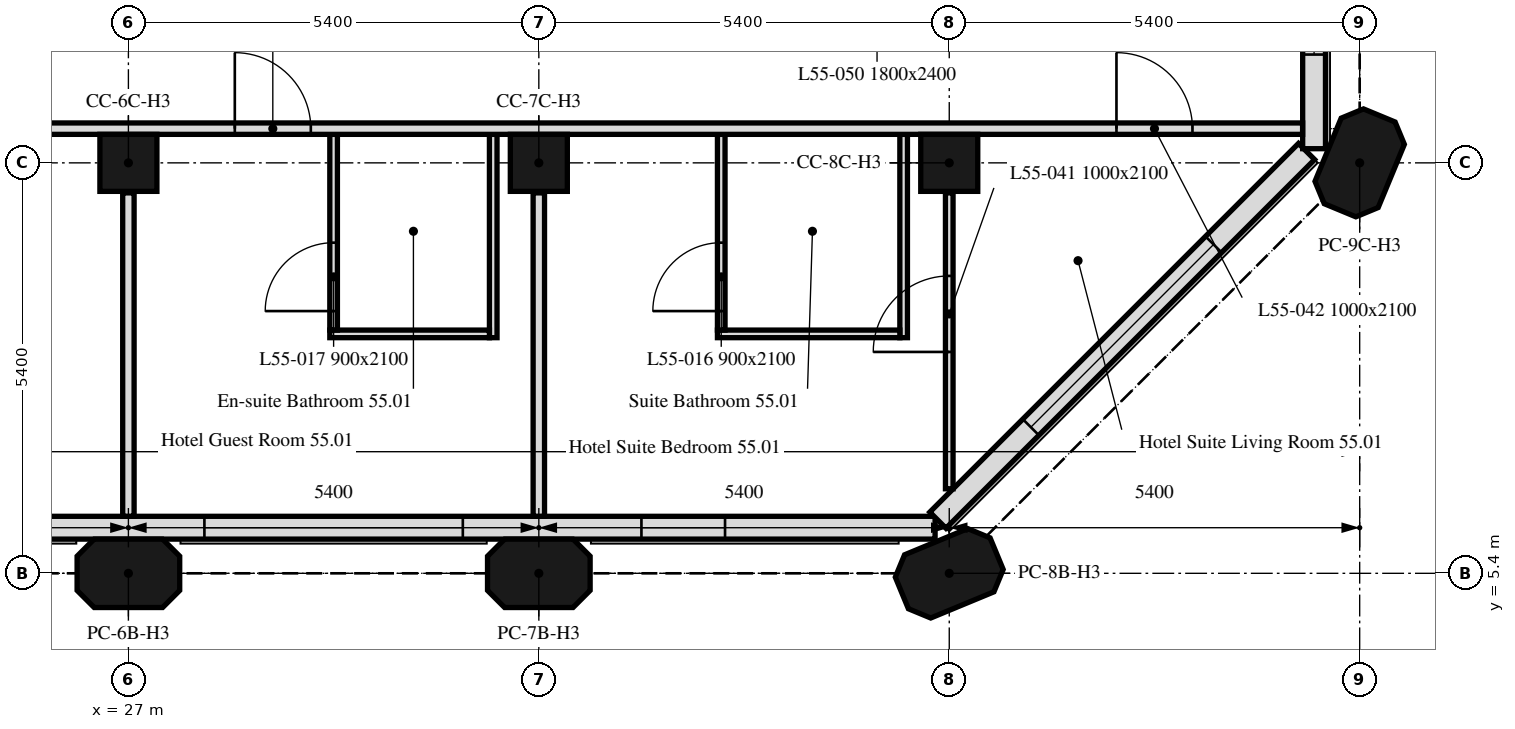
"""IFC4 building model, lengths in metres.
Left out: names, types, materials, properties, quantities, classifications, styles, units other than length and angle.
Written with IfcOpenShell. Run it as: python <this file> out.ifc"""

import sys

from ifc_helpers import new_model, si_unit, direction, frame, frame_2d, origin, origin_2d, place, context, subcontext, project, spatial, polyline, rectangle, outline, extrude, element, fill, save


model = new_model("IFC4")
c1 = context("Model", 3, precision=1e-05, world=origin(), true_north=direction((0.0, 1.0)))
c2 = subcontext(c1, "Body", "Model", "MODEL_VIEW")
j1 = project(units=[si_unit("LENGTHUNIT", "METRE"), si_unit("PLANEANGLEUNIT", "RADIAN")], contexts=[c1])
p1 = place(None, origin())
s1 = spatial("IfcSite", under=j1, at=p1, CompositionType="ELEMENT")
p2 = place(p1, origin())
s2 = spatial("IfcBuilding", under=s1, at=p2, CompositionType="ELEMENT")
p3 = place(p2, frame((0.0, 0.0, 220.3)))
s3 = spatial("IfcBuildingStorey", under=s2, at=p3, CompositionType="ELEMENT", Elevation=220.3)
for number, where, z_axis, x_axis in (
    (1, (27.0, 5.4, 0.0), (0.0, 0.0, 1.0), (1.0, 0.0, 0.0)),
    (2, (32.4, 5.4, 0.0), (0.0, 0.0, 1.0), (1.0, 0.0, 0.0)),
    (3, (37.8, 5.4, 0.0), (0.0, 0.0, 1.0), (0.924, 0.383, 0.0)),
):
    element("IfcColumn", number, at=place(p3, frame(where, z_axis=z_axis, x_axis=x_axis)), inside=s3, PredefinedType="COLUMN", context=c2, shape_type="SweptSolid", body=[
        extrude(outline(polyline([(-0.45, -0.45), (0.45, -0.45), (0.675, -0.225), (0.675, 0.225), (0.45, 0.45), (-0.45, 0.45), (-0.675, 0.225), (-0.675, -0.225), (-0.45, -0.45)])), origin(), (0.0, 0.0, 1.0), 3.0),
    ])
for number, where, z_axis, x_axis in (
    (4, (27.0, 10.8, 0.0), (0.0, 0.0, 1.0), (1.0, 0.0, 0.0)),
    (5, (32.4, 10.8, 0.0), (0.0, 0.0, 1.0), (1.0, 0.0, 0.0)),
    (6, (37.8, 10.8, 0.0), (0.0, 0.0, 1.0), (1.0, 0.0, 0.0)),
):
    element("IfcColumn", number, at=place(p3, frame(where, z_axis=z_axis, x_axis=x_axis)), inside=s3, PredefinedType="COLUMN", context=c2, shape_type="SweptSolid", body=[
        extrude(rectangle(XDim=0.75, YDim=0.75, at=origin_2d()), origin(), (0.0, 0.0, 1.0), 3.0),
    ])
p4 = place(p3, frame((43.2, 10.8, 0.0), z_axis=(0.0, 0.0, 1.0), x_axis=(0.382683432365, 0.923879532511, 0.0)))
e7 = element("IfcColumn", 7, at=p4, inside=s3, PredefinedType="COLUMN", context=c2, shape_type="SweptSolid", body=[
    extrude(outline(polyline([(-0.45, -0.45), (0.45, -0.45), (0.675, -0.225), (0.675, 0.225), (0.45, 0.45), (-0.45, 0.45), (-0.675, 0.225), (-0.675, -0.225), (-0.45, -0.45)])), origin(), (0.0, 0.0, 1.0), 3.0),
])
p5 = place(p3, frame((5.586, 6.0, 0.0), z_axis=(0.0, 0.0, 1.0), x_axis=(1.0, 0.0, 0.0)))
e8 = element("IfcWall", 8, at=p5, inside=s3, PredefinedType="SOLIDWALL", context=c2, shape_type="SweptSolid", body=[
    extrude(rectangle(XDim=32.027, YDim=0.3, at=frame_2d((16.014, 0.0))), origin(), (0.0, 0.0, 1.0), 3.0),
])
p6 = place(p5, frame((0.814, 0.0, 0.9)))
e9 = element("IfcOpeningElement", 9, at=p6, cuts=e8, PredefinedType="OPENING", context=c2, shape_type="SweptSolid", body=[
    extrude(rectangle(XDim=3.4, YDim=1.7, at=frame_2d((1.7, 0.85))), frame((0.0, 0.16, 0.0), z_axis=(0.0, -1.0, 0.0), x_axis=(1.0, 0.0, 0.0)), (0.0, 0.0, 1.0), 0.32),
])
p7 = place(p5, frame((6.564, 0.0, 0.9)))
e10 = element("IfcOpeningElement", 10, at=p7, cuts=e8, PredefinedType="OPENING", context=c2, shape_type="SweptSolid", body=[
    extrude(rectangle(XDim=1.1, YDim=1.7, at=frame_2d((0.55, 0.85))), frame((0.0, 0.16, 0.0), z_axis=(0.0, -1.0, 0.0), x_axis=(1.0, 0.0, 0.0)), (0.0, 0.0, 1.0), 0.32),
])
p8 = place(p5, frame((11.614, 0.0, 0.9)))
e11 = element("IfcOpeningElement", 11, at=p8, cuts=e8, PredefinedType="OPENING", context=c2, shape_type="SweptSolid", body=[
    extrude(rectangle(XDim=3.4, YDim=1.7, at=frame_2d((1.7, 0.85))), frame((0.0, 0.16, 0.0), z_axis=(0.0, -1.0, 0.0), x_axis=(1.0, 0.0, 0.0)), (0.0, 0.0, 1.0), 0.32),
])
p9 = place(p5, frame((17.364, 0.0, 0.9)))
e12 = element("IfcOpeningElement", 12, at=p9, cuts=e8, PredefinedType="OPENING", context=c2, shape_type="SweptSolid", body=[
    extrude(rectangle(XDim=1.1, YDim=1.7, at=frame_2d((0.55, 0.85))), frame((0.0, 0.16, 0.0), z_axis=(0.0, -1.0, 0.0), x_axis=(1.0, 0.0, 0.0)), (0.0, 0.0, 1.0), 0.32),
])
p10 = place(p5, frame((22.414, 0.0, 0.9)))
e13 = element("IfcOpeningElement", 13, at=p10, cuts=e8, PredefinedType="OPENING", context=c2, shape_type="SweptSolid", body=[
    extrude(rectangle(XDim=3.4, YDim=1.7, at=frame_2d((1.7, 0.85))), frame((0.0, 0.16, 0.0), z_axis=(0.0, -1.0, 0.0), x_axis=(1.0, 0.0, 0.0)), (0.0, 0.0, 1.0), 0.32),
])
p11 = place(p5, frame((28.164, 0.0, 0.9)))
e14 = element("IfcOpeningElement", 14, at=p11, cuts=e8, PredefinedType="OPENING", context=c2, shape_type="SweptSolid", body=[
    extrude(rectangle(XDim=1.1, YDim=1.7, at=frame_2d((0.55, 0.85))), frame((0.0, 0.16, 0.0), z_axis=(0.0, -1.0, 0.0), x_axis=(1.0, 0.0, 0.0)), (0.0, 0.0, 1.0), 0.32),
])
p12 = place(p3, frame((37.65, 6.099, 0.0), z_axis=(0.0, 0.0, 1.0), x_axis=(0.707106781187, 0.707106781187, 0.0)))
e15 = element("IfcWall", 15, at=p12, inside=s3, PredefinedType="SOLIDWALL", context=c2, shape_type="SweptSolid", body=[
    extrude(rectangle(XDim=6.86, YDim=0.3, at=frame_2d((3.43, 0.0))), origin(), (0.0, 0.0, 1.0), 3.0),
])
p13 = place(p12, frame((1.73, 0.0, 0.9)))
e16 = element("IfcOpeningElement", 16, at=p13, cuts=e15, PredefinedType="OPENING", context=c2, shape_type="SweptSolid", body=[
    extrude(rectangle(XDim=3.4, YDim=1.7, at=frame_2d((1.7, 0.85))), frame((0.0, 0.16, 0.0), z_axis=(0.0, -1.0, 0.0), x_axis=(1.0, 0.0, 0.0)), (0.0, 0.0, 1.0), 0.32),
])
p14 = place(p3, frame((42.6, 10.986, 0.0), z_axis=(0.0, 0.0, 1.0), x_axis=(0.0, 1.0, 0.0)))
e17 = element("IfcWall", 17, at=p14, inside=s3, PredefinedType="SOLIDWALL", context=c2, shape_type="SweptSolid", body=[
    extrude(rectangle(XDim=5.214, YDim=0.3, at=frame_2d((2.607, 0.0))), origin(), (0.0, 0.0, 1.0), 3.0),
])
p15 = place(p14, frame((1.239, 0.0, 0.9)))
e18 = element("IfcOpeningElement", 18, at=p15, cuts=e17, PredefinedType="OPENING", context=c2, shape_type="SweptSolid", body=[
    extrude(rectangle(XDim=0.65, YDim=1.7, at=frame_2d((0.325, 0.85))), frame((0.0, 0.16, 0.0), z_axis=(0.0, -1.0, 0.0), x_axis=(1.0, 0.0, 0.0)), (0.0, 0.0, 1.0), 0.32),
])
p16 = place(p14, frame((2.764, 0.0, 0.9)))
e19 = element("IfcOpeningElement", 19, at=p16, cuts=e17, PredefinedType="OPENING", context=c2, shape_type="SweptSolid", body=[
    extrude(rectangle(XDim=1.1, YDim=1.7, at=frame_2d((0.55, 0.85))), frame((0.0, 0.16, 0.0), z_axis=(0.0, -1.0, 0.0), x_axis=(1.0, 0.0, 0.0)), (0.0, 0.0, 1.0), 0.32),
])
p17 = place(p3, frame((37.8, 6.512, 0.0), z_axis=(0.0, 0.0, 1.0), x_axis=(0.0, 1.0, 0.0)))
e20 = element("IfcWall", 20, at=p17, inside=s3, PredefinedType="PARTITIONING", context=c2, shape_type="SweptSolid", body=[
    extrude(rectangle(XDim=3.893, YDim=0.1, at=frame_2d((1.946, 0.0))), origin(), (0.0, 0.0, 1.0), 3.0),
])
p18 = place(p17, frame((1.8, 0.0, 0.0)))
e21 = element("IfcOpeningElement", 21, at=p18, cuts=e20, PredefinedType="OPENING", context=c2, shape_type="SweptSolid", body=[
    extrude(rectangle(XDim=1.0, YDim=2.1, at=frame_2d((0.5, 1.05))), frame((0.0, 0.05, 0.0), z_axis=(0.0, -1.0, 0.0), x_axis=(1.0, 0.0, 0.0)), (0.0, 0.0, 1.0), 0.1),
])
p19 = place(p3, frame((37.2, 11.175, 0.0), z_axis=(0.0, 0.0, 1.0), x_axis=(0.0, -1.0, 0.0)))
e22 = element("IfcWall", 22, at=p19, inside=s3, PredefinedType="PARTITIONING", context=c2, shape_type="SweptSolid", body=[
    extrude(rectangle(XDim=2.675, YDim=0.1, at=frame_2d((1.337, 0.0))), origin(), (0.0, 0.0, 1.0), 3.0),
])
p20 = place(p3, frame((37.15, 8.55, 0.0), z_axis=(0.0, 0.0, 1.0), x_axis=(-1.0, 0.0, 0.0)))
e23 = element("IfcWall", 23, at=p20, inside=s3, PredefinedType="PARTITIONING", context=c2, shape_type="SweptSolid", body=[
    extrude(rectangle(XDim=2.4, YDim=0.1, at=frame_2d((1.2, 0.0))), origin(), (0.0, 0.0, 1.0), 3.0),
])
p21 = place(p3, frame((34.8, 8.6, 0.0), z_axis=(0.0, 0.0, 1.0), x_axis=(0.0, 1.0, 0.0)))
e24 = element("IfcWall", 24, at=p21, inside=s3, PredefinedType="PARTITIONING", context=c2, shape_type="SweptSolid", body=[
    extrude(rectangle(XDim=2.575, YDim=0.1, at=frame_2d((1.288, 0.0))), origin(), (0.0, 0.0, 1.0), 3.0),
])
p22 = place(p21, frame((0.25, 0.0, 0.0)))
e25 = element("IfcOpeningElement", 25, at=p22, cuts=e24, PredefinedType="OPENING", context=c2, shape_type="SweptSolid", body=[
    extrude(rectangle(XDim=0.9, YDim=2.1, at=frame_2d((0.45, 1.05))), frame((0.0, 0.05, 0.0), z_axis=(0.0, -1.0, 0.0), x_axis=(1.0, 0.0, 0.0)), (0.0, 0.0, 1.0), 0.1),
])
p23 = place(p3, frame((32.4, 10.405, 0.0), z_axis=(0.0, 0.0, 1.0), x_axis=(0.0, -1.0, 0.0)))
e26 = element("IfcWall", 26, at=p23, inside=s3, PredefinedType="PARTITIONING", context=c2, shape_type="SweptSolid", body=[
    extrude(rectangle(XDim=4.254, YDim=0.15, at=frame_2d((2.127, 0.0))), origin(), (0.0, 0.0, 1.0), 3.0),
])
p24 = place(p3, frame((31.8, 11.175, 0.0), z_axis=(0.0, 0.0, 1.0), x_axis=(0.0, -1.0, 0.0)))
e27 = element("IfcWall", 27, at=p24, inside=s3, PredefinedType="PARTITIONING", context=c2, shape_type="SweptSolid", body=[
    extrude(rectangle(XDim=2.675, YDim=0.1, at=frame_2d((1.337, 0.0))), origin(), (0.0, 0.0, 1.0), 3.0),
])
p25 = place(p3, frame((31.75, 8.55, 0.0), z_axis=(0.0, 0.0, 1.0), x_axis=(-1.0, 0.0, 0.0)))
e28 = element("IfcWall", 28, at=p25, inside=s3, PredefinedType="PARTITIONING", context=c2, shape_type="SweptSolid", body=[
    extrude(rectangle(XDim=2.1, YDim=0.1, at=frame_2d((1.05, 0.0))), origin(), (0.0, 0.0, 1.0), 3.0),
])
p26 = place(p3, frame((29.7, 8.6, 0.0), z_axis=(0.0, 0.0, 1.0), x_axis=(0.0, 1.0, 0.0)))
e29 = element("IfcWall", 29, at=p26, inside=s3, PredefinedType="PARTITIONING", context=c2, shape_type="SweptSolid", body=[
    extrude(rectangle(XDim=2.575, YDim=0.1, at=frame_2d((1.288, 0.0))), origin(), (0.0, 0.0, 1.0), 3.0),
])
p27 = place(p26, frame((0.25, 0.0, 0.0)))
e30 = element("IfcOpeningElement", 30, at=p27, cuts=e29, PredefinedType="OPENING", context=c2, shape_type="SweptSolid", body=[
    extrude(rectangle(XDim=0.9, YDim=2.1, at=frame_2d((0.45, 1.05))), frame((0.0, 0.05, 0.0), z_axis=(0.0, -1.0, 0.0), x_axis=(1.0, 0.0, 0.0)), (0.0, 0.0, 1.0), 0.1),
])
p28 = place(p3, frame((27.0, 10.405, 0.0), z_axis=(0.0, 0.0, 1.0), x_axis=(0.0, -1.0, 0.0)))
e31 = element("IfcWall", 31, at=p28, inside=s3, PredefinedType="PARTITIONING", context=c2, shape_type="SweptSolid", body=[
    extrude(rectangle(XDim=4.254, YDim=0.15, at=frame_2d((2.127, 0.0))), origin(), (0.0, 0.0, 1.0), 3.0),
])
p29 = place(p3, frame((0.751, 11.25, 0.0), z_axis=(0.0, 0.0, 1.0), x_axis=(1.0, 0.0, 0.0)))
e32 = element("IfcWall", 32, at=p29, inside=s3, PredefinedType="PARTITIONING", context=c2, shape_type="SweptSolid", body=[
    extrude(rectangle(XDim=41.698, YDim=0.15, at=frame_2d((20.849, 0.0))), origin(), (0.0, 0.0, 1.0), 3.0),
])
p30 = place(p29, frame((39.249, 0.0, 0.0)))
e33 = element("IfcOpeningElement", 33, at=p30, cuts=e32, PredefinedType="OPENING", context=c2, shape_type="SweptSolid", body=[
    extrude(rectangle(XDim=1.0, YDim=2.1, at=frame_2d((0.5, 1.05))), frame((0.0, 0.075, 0.0), z_axis=(0.0, -1.0, 0.0), x_axis=(1.0, 0.0, 0.0)), (0.0, 0.0, 1.0), 0.15),
])
p31 = place(p29, frame((27.649, 0.0, 0.0)))
e34 = element("IfcOpeningElement", 34, at=p31, cuts=e32, PredefinedType="OPENING", context=c2, shape_type="SweptSolid", body=[
    extrude(rectangle(XDim=1.0, YDim=2.1, at=frame_2d((0.5, 1.05))), frame((0.0, 0.075, 0.0), z_axis=(0.0, -1.0, 0.0), x_axis=(1.0, 0.0, 0.0)), (0.0, 0.0, 1.0), 0.15),
])
p32 = place(p29, frame((23.049, 0.0, 0.0)))
e35 = element("IfcOpeningElement", 35, at=p32, cuts=e32, PredefinedType="OPENING", context=c2, shape_type="SweptSolid", body=[
    extrude(rectangle(XDim=1.0, YDim=2.1, at=frame_2d((0.5, 1.05))), frame((0.0, 0.075, 0.0), z_axis=(0.0, -1.0, 0.0), x_axis=(1.0, 0.0, 0.0)), (0.0, 0.0, 1.0), 0.15),
])
p33 = place(p29, frame((11.449, 0.0, 0.0)))
e36 = element("IfcOpeningElement", 36, at=p33, cuts=e32, PredefinedType="OPENING", context=c2, shape_type="SweptSolid", body=[
    extrude(rectangle(XDim=1.0, YDim=2.1, at=frame_2d((0.5, 1.05))), frame((0.0, 0.075, 0.0), z_axis=(0.0, -1.0, 0.0), x_axis=(1.0, 0.0, 0.0)), (0.0, 0.0, 1.0), 0.15),
])
p34 = place(p29, frame((2.744, 0.0, 0.0)))
e37 = element("IfcOpeningElement", 37, at=p34, cuts=e32, PredefinedType="OPENING", context=c2, shape_type="SweptSolid", body=[
    extrude(rectangle(XDim=1.0, YDim=2.1, at=frame_2d((0.5, 1.05))), frame((0.0, 0.075, 0.0), z_axis=(0.0, -1.0, 0.0), x_axis=(1.0, 0.0, 0.0)), (0.0, 0.0, 1.0), 0.15),
])
p35 = place(p10, origin())
e38 = element("IfcWindow", 38, at=p35, inside=s3, PartitioningType="SINGLE_PANEL", PredefinedType="WINDOW", context=c2, shape_type="SweptSolid", body=[
    extrude(rectangle(XDim=3.4, YDim=1.7, at=frame_2d((1.7, 0.85))), frame((0.0, 0.03, 0.0), z_axis=(0.0, -1.0, 0.0), x_axis=(1.0, 0.0, 0.0)), (0.0, 0.0, 1.0), 0.06),
])
fill(e13, e38)
p36 = place(p11, origin())
e39 = element("IfcWindow", 39, at=p36, inside=s3, PartitioningType="SINGLE_PANEL", PredefinedType="WINDOW", context=c2, shape_type="SweptSolid", body=[
    extrude(rectangle(XDim=1.1, YDim=1.7, at=frame_2d((0.55, 0.85))), frame((0.0, 0.03, 0.0), z_axis=(0.0, -1.0, 0.0), x_axis=(1.0, 0.0, 0.0)), (0.0, 0.0, 1.0), 0.06),
])
fill(e14, e39)
p37 = place(p13, origin())
e40 = element("IfcWindow", 40, at=p37, inside=s3, PartitioningType="SINGLE_PANEL", PredefinedType="WINDOW", context=c2, shape_type="SweptSolid", body=[
    extrude(rectangle(XDim=3.4, YDim=1.7, at=frame_2d((1.7, 0.85))), frame((0.0, 0.03, 0.0), z_axis=(0.0, -1.0, 0.0), x_axis=(1.0, 0.0, 0.0)), (0.0, 0.0, 1.0), 0.06),
])
fill(e16, e40)
p38 = place(p15, origin())
e41 = element("IfcWindow", 41, at=p38, inside=s3, PartitioningType="SINGLE_PANEL", PredefinedType="WINDOW", context=c2, shape_type="SweptSolid", body=[
    extrude(rectangle(XDim=0.65, YDim=1.7, at=frame_2d((0.325, 0.85))), frame((0.0, 0.03, 0.0), z_axis=(0.0, -1.0, 0.0), x_axis=(1.0, 0.0, 0.0)), (0.0, 0.0, 1.0), 0.06),
])
fill(e18, e41)
p39 = place(p22, origin())
e42 = element("IfcDoor", 42, at=p39, inside=s3, OperationType="SINGLE_SWING_LEFT", PredefinedType="DOOR", context=c2, shape_type="SweptSolid", body=[
    extrude(rectangle(XDim=0.9, YDim=2.1, at=frame_2d((0.45, 1.05))), frame((0.0, 0.025, 0.0), z_axis=(0.0, -1.0, 0.0), x_axis=(1.0, 0.0, 0.0)), (0.0, 0.0, 1.0), 0.05),
])
fill(e25, e42)
p40 = place(p27, origin())
e43 = element("IfcDoor", 43, at=p40, inside=s3, OperationType="SINGLE_SWING_LEFT", PredefinedType="DOOR", context=c2, shape_type="SweptSolid", body=[
    extrude(rectangle(XDim=0.9, YDim=2.1, at=frame_2d((0.45, 1.05))), frame((0.0, 0.025, 0.0), z_axis=(0.0, -1.0, 0.0), x_axis=(1.0, 0.0, 0.0)), (0.0, 0.0, 1.0), 0.05),
])
fill(e30, e43)
p41 = place(p18, origin())
e44 = element("IfcDoor", 44, at=p41, inside=s3, OperationType="SINGLE_SWING_LEFT", PredefinedType="DOOR", context=c2, shape_type="SweptSolid", body=[
    extrude(rectangle(XDim=1.0, YDim=2.1, at=frame_2d((0.5, 1.05))), frame((0.0, 0.025, 0.0), z_axis=(0.0, -1.0, 0.0), x_axis=(1.0, 0.0, 0.0)), (0.0, 0.0, 1.0), 0.05),
])
fill(e21, e44)
p42 = place(p30, origin())
e45 = element("IfcDoor", 45, at=p42, inside=s3, OperationType="SINGLE_SWING_RIGHT", PredefinedType="DOOR", context=c2, shape_type="SweptSolid", body=[
    extrude(rectangle(XDim=1.0, YDim=2.1, at=frame_2d((0.5, 1.05))), frame((0.0, 0.025, 0.0), z_axis=(0.0, -1.0, 0.0), x_axis=(1.0, 0.0, 0.0)), (0.0, 0.0, 1.0), 0.05),
])
fill(e33, e45)
p43 = place(p31, origin())
e46 = element("IfcDoor", 46, at=p43, inside=s3, OperationType="SINGLE_SWING_RIGHT", PredefinedType="DOOR", context=c2, shape_type="SweptSolid", body=[
    extrude(rectangle(XDim=1.0, YDim=2.1, at=frame_2d((0.5, 1.05))), frame((0.0, 0.025, 0.0), z_axis=(0.0, -1.0, 0.0), x_axis=(1.0, 0.0, 0.0)), (0.0, 0.0, 1.0), 0.05),
])
fill(e34, e46)
save(model, sys.argv[1])
